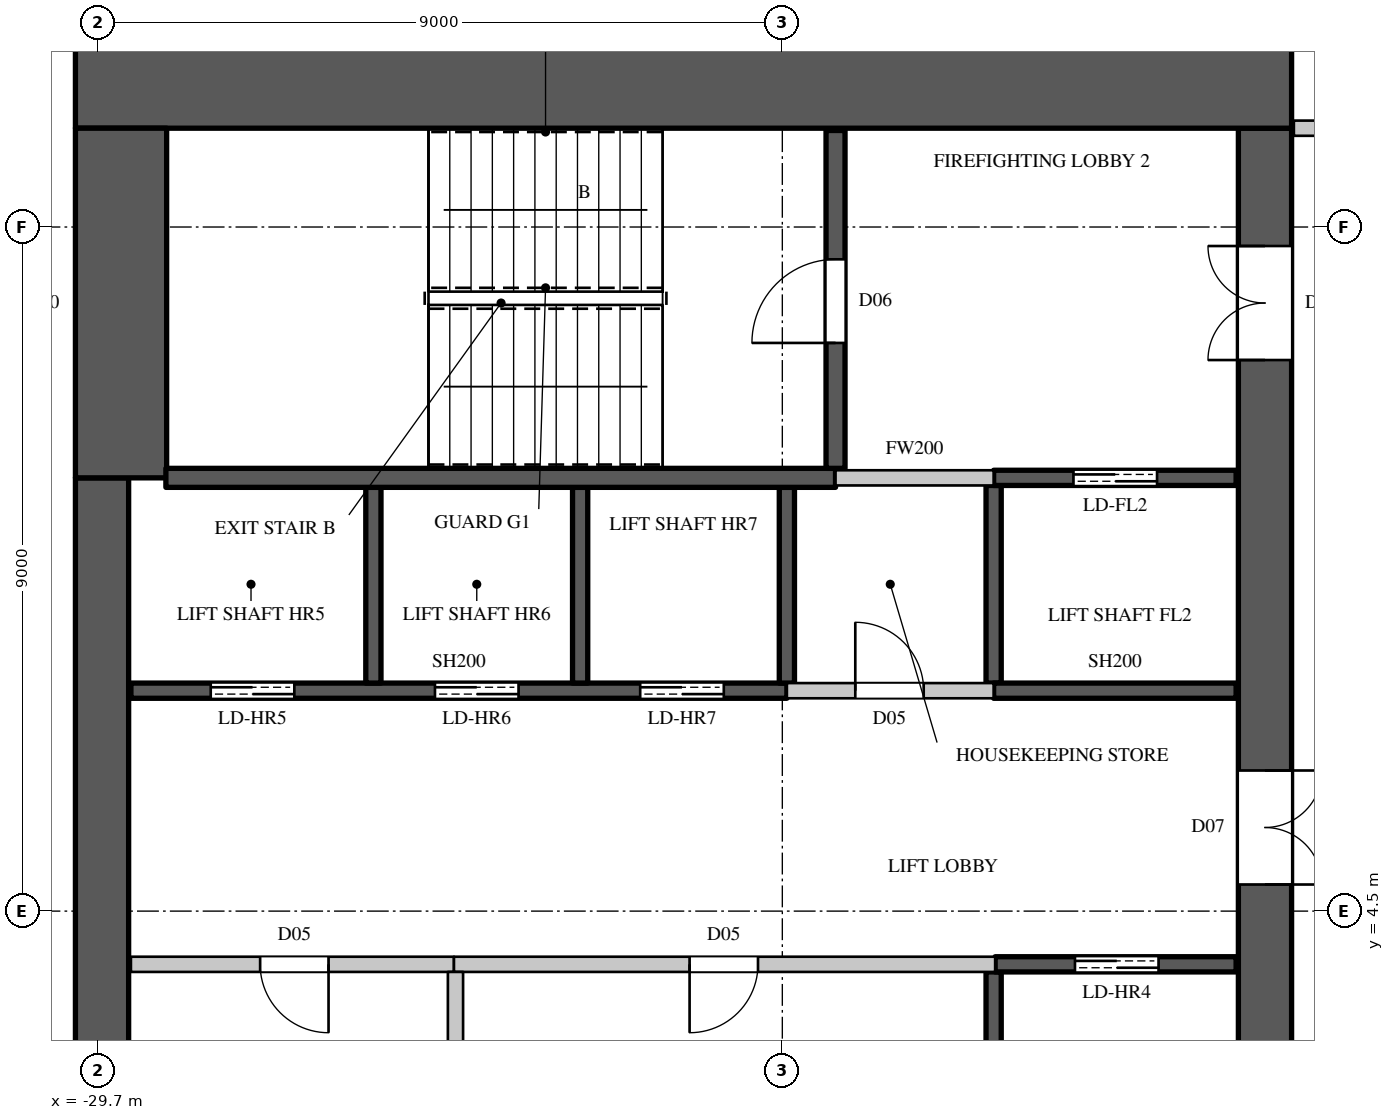
"""IFC4 building model, lengths in metres.
Left out: names, types, materials, properties, quantities, classifications, styles, units other than length and angle.
Written with IfcOpenShell. Run it as: python <this file> out.ifc"""

import sys

from ifc_helpers import new_model, si_unit, direction, frame, frame_2d, origin, place, context, subcontext, project, spatial, rectangle, extrude, element, fill, save


model = new_model("IFC4")
c1 = context("Model", 3, precision=1e-05, world=origin(), true_north=direction((0.0, 1.0)))
c2 = subcontext(c1, "Body", "Model", "MODEL_VIEW")
j1 = project(units=[si_unit("LENGTHUNIT", "METRE"), si_unit("PLANEANGLEUNIT", "RADIAN")], contexts=[c1])
p1 = place(None, origin())
s1 = spatial("IfcSite", under=j1, at=p1, CompositionType="ELEMENT")
p2 = place(p1, origin())
s2 = spatial("IfcBuilding", under=s1, at=p2, CompositionType="ELEMENT")
p3 = place(p2, frame((0.0, 0.0, 272.1)))
s3 = spatial("IfcBuildingStorey", under=s2, at=p3, CompositionType="ELEMENT", Elevation=272.1)
p4 = place(p3, frame((-30.0, 15.4, 0.0), z_axis=(0.0, 0.0, 1.0), x_axis=(1.0, 0.0, 0.0)))
e1 = element("IfcWall", 1, at=p4, inside=s3, PredefinedType="SHEAR", context=c2, shape_type="SweptSolid", body=[
    extrude(rectangle(XDim=16.0, YDim=1.2, at=frame_2d((8.0, 0.0))), origin(), (0.0, 0.0, 1.0), 4.1),
])
p5 = place(p3, frame((-14.35, -14.8, 0.0), z_axis=(0.0, 0.0, 1.0), x_axis=(0.0, 1.0, 0.0)))
e2 = element("IfcWall", 2, at=p5, inside=s3, PredefinedType="SHEAR", context=c2, shape_type="SweptSolid", body=[
    extrude(rectangle(XDim=29.6, YDim=0.7, at=frame_2d((14.8, 0.0))), origin(), (0.0, 0.0, 1.0), 4.1),
])
p6 = place(p5, frame((1.55, 0.0, 0.0)))
e3 = element("IfcOpeningElement", 3, at=p6, cuts=e2, PredefinedType="OPENING", context=c2, shape_type="SweptSolid", body=[
    extrude(rectangle(XDim=1.5, YDim=2.4, at=frame_2d((0.75, 1.2))), frame((0.0, 0.36, 0.0), z_axis=(0.0, -1.0, 0.0), x_axis=(1.0, 0.0, 0.0)), (0.0, 0.0, 1.0), 0.72),
])
p7 = place(p5, frame((26.55, 0.0, 0.0)))
e4 = element("IfcOpeningElement", 4, at=p7, cuts=e2, PredefinedType="OPENING", context=c2, shape_type="SweptSolid", body=[
    extrude(rectangle(XDim=1.5, YDim=2.4, at=frame_2d((0.75, 1.2))), frame((0.0, 0.36, 0.0), z_axis=(0.0, -1.0, 0.0), x_axis=(1.0, 0.0, 0.0)), (0.0, 0.0, 1.0), 0.72),
])
p8 = place(p5, frame((8.45, 0.0, 0.0)))
e5 = element("IfcOpeningElement", 5, at=p8, cuts=e2, PredefinedType="OPENING", context=c2, shape_type="SweptSolid", body=[
    extrude(rectangle(XDim=1.5, YDim=2.4, at=frame_2d((0.75, 1.2))), frame((0.0, 0.36, 0.0), z_axis=(0.0, -1.0, 0.0), x_axis=(1.0, 0.0, 0.0)), (0.0, 0.0, 1.0), 0.72),
])
p9 = place(p5, frame((19.65, 0.0, 0.0)))
e6 = element("IfcOpeningElement", 6, at=p9, cuts=e2, PredefinedType="OPENING", context=c2, shape_type="SweptSolid", body=[
    extrude(rectangle(XDim=1.5, YDim=2.4, at=frame_2d((0.75, 1.2))), frame((0.0, 0.36, 0.0), z_axis=(0.0, -1.0, 0.0), x_axis=(1.0, 0.0, 0.0)), (0.0, 0.0, 1.0), 0.72),
])
p10 = place(p5, frame((14.5, 0.0, 0.0)))
e7 = element("IfcOpeningElement", 7, at=p10, cuts=e2, PredefinedType="OPENING", context=c2, shape_type="SweptSolid", body=[
    extrude(rectangle(XDim=0.6, YDim=2.0, at=frame_2d((0.3, 1.0))), frame((0.0, 0.36, 0.0), z_axis=(0.0, -1.0, 0.0), x_axis=(1.0, 0.0, 0.0)), (0.0, 0.0, 1.0), 0.72),
])
p11 = place(p3, frame((-29.65, -10.2, 0.0), z_axis=(0.0, 0.0, 1.0), x_axis=(0.0, 1.0, 0.0)))
e8 = element("IfcWall", 8, at=p11, inside=s3, PredefinedType="SHEAR", context=c2, shape_type="SweptSolid", body=[
    extrude(rectangle(XDim=20.4, YDim=0.7, at=frame_2d((10.2, 0.0))), origin(), (0.0, 0.0, 1.0), 4.1),
])
p12 = place(p3, frame((-29.4, 10.2, 0.0), z_axis=(0.0, 0.0, 1.0), x_axis=(0.0, 1.0, 0.0)))
e9 = element("IfcWall", 9, at=p12, inside=s3, PredefinedType="SHEAR", context=c2, shape_type="SweptSolid", body=[
    extrude(rectangle(XDim=4.6, YDim=1.2, at=frame_2d((2.3, 0.0))), origin(), (0.0, 0.0, 1.0), 4.1),
])
p13 = place(p3, frame((-29.27, 3.8, 0.0), z_axis=(0.0, 0.0, 1.0), x_axis=(1.0, 0.0, 0.0)))
e10 = element("IfcWall", 10, at=p13, inside=s3, PredefinedType="PARTITIONING", context=c2, shape_type="SweptSolid", body=[
    extrude(rectangle(XDim=4.25, YDim=0.2, at=frame_2d((2.125, 0.0))), origin(), (0.0, 0.0, 1.0), 3.8),
])
p14 = place(p13, frame((1.7, 0.0, 0.0)))
e11 = element("IfcOpeningElement", 11, at=p14, cuts=e10, PredefinedType="OPENING", context=c2, shape_type="SweptSolid", body=[
    extrude(rectangle(XDim=0.9, YDim=2.2, at=frame_2d((0.45, 1.1))), frame((0.0, 0.11, 0.0), z_axis=(0.0, -1.0, 0.0), x_axis=(1.0, 0.0, 0.0)), (0.0, 0.0, 1.0), 0.22),
])
p15 = place(p3, frame((-20.64, 7.4, 0.0), z_axis=(0.0, 0.0, 1.0), x_axis=(1.0, 0.0, 0.0)))
e12 = element("IfcWall", 12, at=p15, inside=s3, PredefinedType="PARTITIONING", context=c2, shape_type="SweptSolid", body=[
    extrude(rectangle(XDim=2.72, YDim=0.2, at=frame_2d((1.36, 0.0))), origin(), (0.0, 0.0, 1.0), 3.8),
])
p16 = place(p15, frame((0.9, 0.0, 0.0)))
e13 = element("IfcOpeningElement", 13, at=p16, cuts=e12, PredefinedType="OPENING", context=c2, shape_type="SweptSolid", body=[
    extrude(rectangle(XDim=0.9, YDim=2.2, at=frame_2d((0.45, 1.1))), frame((0.0, 0.11, 0.0), z_axis=(0.0, -1.0, 0.0), x_axis=(1.0, 0.0, 0.0)), (0.0, 0.0, 1.0), 0.22),
])
p17 = place(p3, frame((-20.0, 10.2, 0.0), z_axis=(0.0, 0.0, 1.0), x_axis=(1.0, 0.0, 0.0)))
e14 = element("IfcWall", 14, at=p17, inside=s3, PredefinedType="PARTITIONING", context=c2, shape_type="SweptSolid", body=[
    extrude(rectangle(XDim=2.08, YDim=0.2, at=frame_2d((1.04, 0.0))), origin(), (0.0, 0.0, 1.0), 3.8),
])
p18 = place(p3, frame((-13.97, 14.8, 0.0), z_axis=(0.0, 0.0, 1.0), x_axis=(1.0, 0.0, 0.0)))
e15 = element("IfcWall", 15, at=p18, inside=s3, PredefinedType="PARTITIONING", context=c2, shape_type="SweptSolid", body=[
    extrude(rectangle(XDim=3.07, YDim=0.2, at=frame_2d((1.535, 0.0))), origin(), (0.0, 0.0, 1.0), 3.8),
])
p19 = place(p3, frame((-25.02, 3.8, 0.0), z_axis=(0.0, 0.0, 1.0), x_axis=(1.0, 0.0, 0.0)))
e16 = element("IfcWall", 16, at=p19, inside=s3, PredefinedType="PARTITIONING", context=c2, shape_type="SweptSolid", body=[
    extrude(rectangle(XDim=7.12, YDim=0.2, at=frame_2d((3.56, 0.0))), origin(), (0.0, 0.0, 1.0), 3.8),
])
p20 = place(p19, frame((3.1, 0.0, 0.0)))
e17 = element("IfcOpeningElement", 17, at=p20, cuts=e16, PredefinedType="OPENING", context=c2, shape_type="SweptSolid", body=[
    extrude(rectangle(XDim=0.9, YDim=2.2, at=frame_2d((0.45, 1.1))), frame((0.0, 0.11, 0.0), z_axis=(0.0, -1.0, 0.0), x_axis=(1.0, 0.0, 0.0)), (0.0, 0.0, 1.0), 0.22),
])
p21 = place(p3, frame((-25.0, 1.1, 0.0), z_axis=(0.0, 0.0, 1.0), x_axis=(0.0, 1.0, 0.0)))
e18 = element("IfcWall", 18, at=p21, inside=s3, PredefinedType="PARTITIONING", context=c2, shape_type="SweptSolid", body=[
    extrude(rectangle(XDim=2.6, YDim=0.2, at=frame_2d((1.3, 0.0))), origin(), (0.0, 0.0, 1.0), 3.8),
])
p22 = place(p3, frame((-29.27, 7.4, 0.0), z_axis=(0.0, 0.0, 1.0), x_axis=(1.0, 0.0, 0.0)))
e19 = element("IfcWall", 19, at=p22, inside=s3, PredefinedType="SHEAR", context=c2, shape_type="SweptSolid", body=[
    extrude(rectangle(XDim=8.63, YDim=0.2, at=frame_2d((4.315, 0.0))), origin(), (0.0, 0.0, 1.0), 3.8),
])
p23 = place(p22, frame((1.05, 0.0, 0.0)))
e20 = element("IfcOpeningElement", 20, at=p23, cuts=e19, PredefinedType="OPENING", context=c2, shape_type="SweptSolid", body=[
    extrude(rectangle(XDim=1.1, YDim=2.2, at=frame_2d((0.55, 1.1))), frame((0.0, 0.11, 0.0), z_axis=(0.0, -1.0, 0.0), x_axis=(1.0, 0.0, 0.0)), (0.0, 0.0, 1.0), 0.22),
])
p24 = place(p22, frame((4.0, 0.0, 0.0)))
e21 = element("IfcOpeningElement", 21, at=p24, cuts=e19, PredefinedType="OPENING", context=c2, shape_type="SweptSolid", body=[
    extrude(rectangle(XDim=1.1, YDim=2.2, at=frame_2d((0.55, 1.1))), frame((0.0, 0.11, 0.0), z_axis=(0.0, -1.0, 0.0), x_axis=(1.0, 0.0, 0.0)), (0.0, 0.0, 1.0), 0.22),
])
p25 = place(p22, frame((6.7, 0.0, 0.0)))
e22 = element("IfcOpeningElement", 22, at=p25, cuts=e19, PredefinedType="OPENING", context=c2, shape_type="SweptSolid", body=[
    extrude(rectangle(XDim=1.1, YDim=2.2, at=frame_2d((0.55, 1.1))), frame((0.0, 0.11, 0.0), z_axis=(0.0, -1.0, 0.0), x_axis=(1.0, 0.0, 0.0)), (0.0, 0.0, 1.0), 0.22),
])
for number, where, z_axis, x_axis in (
    (23, (-26.08, 7.5, 0.0), (0.0, 0.0, 1.0), (0.0, 1.0, 0.0)),
    (24, (-23.36, 7.5, 0.0), (0.0, 0.0, 1.0), (0.0, 1.0, 0.0)),
):
    element("IfcWall", number, at=place(p3, frame(where, z_axis=z_axis, x_axis=x_axis)), inside=s3, PredefinedType="SHEAR", context=c2, shape_type="SweptSolid", body=[
        extrude(rectangle(XDim=2.575, YDim=0.2, at=frame_2d((1.288, 0.0))), origin(), (0.0, 0.0, 1.0), 4.1),
    ])
p26 = place(p3, frame((-20.64, 7.5, 0.0), z_axis=(0.0, 0.0, 1.0), x_axis=(0.0, 1.0, 0.0)))
e25 = element("IfcWall", 25, at=p26, inside=s3, PredefinedType="SHEAR", context=c2, shape_type="SweptSolid", body=[
    extrude(rectangle(XDim=2.575, YDim=0.2, at=frame_2d((1.288, 0.0))), origin(), (0.0, 0.0, 1.0), 3.8),
])
p27 = place(p3, frame((-17.92, 1.1, 0.0), z_axis=(0.0, 0.0, 1.0), x_axis=(0.0, 1.0, 0.0)))
e26 = element("IfcWall", 26, at=p27, inside=s3, PredefinedType="SHEAR", context=c2, shape_type="SweptSolid", body=[
    extrude(rectangle(XDim=2.6, YDim=0.2, at=frame_2d((1.3, 0.0))), origin(), (0.0, 0.0, 1.0), 3.8),
])
p28 = place(p3, frame((-17.9, 3.8, 0.0), z_axis=(0.0, 0.0, 1.0), x_axis=(1.0, 0.0, 0.0)))
e27 = element("IfcWall", 27, at=p28, inside=s3, PredefinedType="SHEAR", context=c2, shape_type="SweptSolid", body=[
    extrude(rectangle(XDim=3.17, YDim=0.2, at=frame_2d((1.585, 0.0))), origin(), (0.0, 0.0, 1.0), 3.8),
])
p29 = place(p28, frame((1.05, 0.0, 0.0)))
e28 = element("IfcOpeningElement", 28, at=p29, cuts=e27, PredefinedType="OPENING", context=c2, shape_type="SweptSolid", body=[
    extrude(rectangle(XDim=1.1, YDim=2.2, at=frame_2d((0.55, 1.1))), frame((0.0, 0.11, 0.0), z_axis=(0.0, -1.0, 0.0), x_axis=(1.0, 0.0, 0.0)), (0.0, 0.0, 1.0), 0.22),
])
p30 = place(p3, frame((-17.92, 7.5, 0.0), z_axis=(0.0, 0.0, 1.0), x_axis=(0.0, 1.0, 0.0)))
e29 = element("IfcWall", 29, at=p30, inside=s3, PredefinedType="SHEAR", context=c2, shape_type="SweptSolid", body=[
    extrude(rectangle(XDim=2.6, YDim=0.2, at=frame_2d((1.3, 0.0))), origin(), (0.0, 0.0, 1.0), 3.8),
])
p31 = place(p3, frame((-17.92, 7.4, 0.0), z_axis=(0.0, 0.0, 1.0), x_axis=(1.0, 0.0, 0.0)))
e30 = element("IfcWall", 30, at=p31, inside=s3, PredefinedType="SHEAR", context=c2, shape_type="SweptSolid", body=[
    extrude(rectangle(XDim=3.19, YDim=0.2, at=frame_2d((1.595, 0.0))), origin(), (0.0, 0.0, 1.0), 3.8),
])
p32 = place(p3, frame((-17.92, 10.2, 0.0), z_axis=(0.0, 0.0, 1.0), x_axis=(1.0, 0.0, 0.0)))
e31 = element("IfcWall", 31, at=p32, inside=s3, PredefinedType="SHEAR", context=c2, shape_type="SweptSolid", body=[
    extrude(rectangle(XDim=3.19, YDim=0.2, at=frame_2d((1.595, 0.0))), origin(), (0.0, 0.0, 1.0), 3.8),
])
p33 = place(p32, frame((1.05, 0.0, 0.0)))
e32 = element("IfcOpeningElement", 32, at=p33, cuts=e31, PredefinedType="OPENING", context=c2, shape_type="SweptSolid", body=[
    extrude(rectangle(XDim=1.1, YDim=2.2, at=frame_2d((0.55, 1.1))), frame((0.0, 0.11, 0.0), z_axis=(0.0, -1.0, 0.0), x_axis=(1.0, 0.0, 0.0)), (0.0, 0.0, 1.0), 0.22),
])
p34 = place(p3, frame((-28.81, 10.2, 0.0), z_axis=(0.0, 0.0, 1.0), x_axis=(1.0, 0.0, 0.0)))
e33 = element("IfcWall", 33, at=p34, inside=s3, PredefinedType="SHEAR", context=c2, shape_type="SweptSolid", body=[
    extrude(rectangle(XDim=8.81, YDim=0.25, at=frame_2d((4.405, 0.0))), origin(), (0.0, 0.0, 1.0), 3.8),
])
p35 = place(p3, frame((-20.0, 10.325, 0.0), z_axis=(0.0, 0.0, 1.0), x_axis=(0.0, 1.0, 0.0)))
e34 = element("IfcWall", 34, at=p35, inside=s3, PredefinedType="SHEAR", context=c2, shape_type="SweptSolid", body=[
    extrude(rectangle(XDim=4.445, YDim=0.25, at=frame_2d((2.223, 0.0))), origin(), (0.0, 0.0, 1.0), 3.8),
])
p36 = place(p35, frame((1.65, 0.0, 0.0)))
e35 = element("IfcOpeningElement", 35, at=p36, cuts=e34, PredefinedType="OPENING", context=c2, shape_type="SweptSolid", body=[
    extrude(rectangle(XDim=1.1, YDim=2.2, at=frame_2d((0.55, 1.1))), frame((0.0, 0.135, 0.0), z_axis=(0.0, -1.0, 0.0), x_axis=(1.0, 0.0, 0.0)), (0.0, 0.0, 1.0), 0.27),
])
p37 = place(p36, origin())
e36 = element("IfcDoor", 36, at=p37, inside=s3, OperationType="SINGLE_SWING_LEFT", PredefinedType="DOOR", context=c2, shape_type="SweptSolid", body=[
    extrude(rectangle(XDim=1.1, YDim=2.2, at=frame_2d((0.55, 1.1))), frame((0.0, 0.025, 0.0), z_axis=(0.0, -1.0, 0.0), x_axis=(1.0, 0.0, 0.0)), (0.0, 0.0, 1.0), 0.05),
])
fill(e35, e36)
p38 = place(p14, origin())
e37 = element("IfcDoor", 37, at=p38, inside=s3, OperationType="SINGLE_SWING_LEFT", PredefinedType="DOOR", context=c2, shape_type="SweptSolid", body=[
    extrude(rectangle(XDim=0.9, YDim=2.2, at=frame_2d((0.45, 1.1))), frame((0.0, 0.025, 0.0), z_axis=(0.0, -1.0, 0.0), x_axis=(1.0, 0.0, 0.0)), (0.0, 0.0, 1.0), 0.05),
])
fill(e11, e37)
p39 = place(p20, origin())
e38 = element("IfcDoor", 38, at=p39, inside=s3, OperationType="SINGLE_SWING_RIGHT", PredefinedType="DOOR", context=c2, shape_type="SweptSolid", body=[
    extrude(rectangle(XDim=0.9, YDim=2.2, at=frame_2d((0.45, 1.1))), frame((0.0, 0.025, 0.0), z_axis=(0.0, -1.0, 0.0), x_axis=(1.0, 0.0, 0.0)), (0.0, 0.0, 1.0), 0.05),
])
fill(e17, e38)
p40 = place(p16, origin())
e39 = element("IfcDoor", 39, at=p40, inside=s3, OperationType="SINGLE_SWING_LEFT", PredefinedType="DOOR", context=c2, shape_type="SweptSolid", body=[
    extrude(rectangle(XDim=0.9, YDim=2.2, at=frame_2d((0.45, 1.1))), frame((0.0, 0.025, 0.0), z_axis=(0.0, -1.0, 0.0), x_axis=(1.0, 0.0, 0.0)), (0.0, 0.0, 1.0), 0.05),
])
fill(e13, e39)
p41 = place(p29, origin())
e40 = element("IfcDoor", 40, at=p41, inside=s3, OperationType="DOUBLE_DOOR_SLIDING", PredefinedType="DOOR", context=c2, shape_type="SweptSolid", body=[
    extrude(rectangle(XDim=1.1, YDim=2.2, at=frame_2d((0.55, 1.1))), frame((0.0, 0.025, 0.0), z_axis=(0.0, -1.0, 0.0), x_axis=(1.0, 0.0, 0.0)), (0.0, 0.0, 1.0), 0.05),
])
fill(e28, e40)
p42 = place(p23, origin())
e41 = element("IfcDoor", 41, at=p42, inside=s3, OperationType="DOUBLE_DOOR_SLIDING", PredefinedType="DOOR", context=c2, shape_type="SweptSolid", body=[
    extrude(rectangle(XDim=1.1, YDim=2.2, at=frame_2d((0.55, 1.1))), frame((0.0, 0.025, 0.0), z_axis=(0.0, -1.0, 0.0), x_axis=(1.0, 0.0, 0.0)), (0.0, 0.0, 1.0), 0.05),
])
fill(e20, e41)
p43 = place(p24, origin())
e42 = element("IfcDoor", 42, at=p43, inside=s3, OperationType="DOUBLE_DOOR_SLIDING", PredefinedType="DOOR", context=c2, shape_type="SweptSolid", body=[
    extrude(rectangle(XDim=1.1, YDim=2.2, at=frame_2d((0.55, 1.1))), frame((0.0, 0.025, 0.0), z_axis=(0.0, -1.0, 0.0), x_axis=(1.0, 0.0, 0.0)), (0.0, 0.0, 1.0), 0.05),
])
fill(e21, e42)
p44 = place(p25, origin())
e43 = element("IfcDoor", 43, at=p44, inside=s3, OperationType="DOUBLE_DOOR_SLIDING", PredefinedType="DOOR", context=c2, shape_type="SweptSolid", body=[
    extrude(rectangle(XDim=1.1, YDim=2.2, at=frame_2d((0.55, 1.1))), frame((0.0, 0.025, 0.0), z_axis=(0.0, -1.0, 0.0), x_axis=(1.0, 0.0, 0.0)), (0.0, 0.0, 1.0), 0.05),
])
fill(e22, e43)
p45 = place(p33, origin())
e44 = element("IfcDoor", 44, at=p45, inside=s3, OperationType="DOUBLE_DOOR_SLIDING", PredefinedType="DOOR", context=c2, shape_type="SweptSolid", body=[
    extrude(rectangle(XDim=1.1, YDim=2.2, at=frame_2d((0.55, 1.1))), frame((0.0, 0.025, 0.0), z_axis=(0.0, -1.0, 0.0), x_axis=(1.0, 0.0, 0.0)), (0.0, 0.0, 1.0), 0.05),
])
fill(e32, e44)
p46 = place(p7, origin())
e45 = element("IfcDoor", 45, at=p46, inside=s3, OperationType="DOUBLE_DOOR_SINGLE_SWING", PredefinedType="DOOR", context=c2, shape_type="SweptSolid", body=[
    extrude(rectangle(XDim=1.5, YDim=2.4, at=frame_2d((0.75, 1.2))), frame((0.0, 0.345, 0.0), z_axis=(0.0, -1.0, 0.0), x_axis=(1.0, 0.0, 0.0)), (0.0, 0.0, 1.0), 0.05),
])
fill(e4, e45)
p47 = place(p9, origin())
e46 = element("IfcDoor", 46, at=p47, inside=s3, OperationType="DOUBLE_DOOR_SINGLE_SWING", PredefinedType="DOOR", context=c2, shape_type="SweptSolid", body=[
    extrude(rectangle(XDim=1.5, YDim=2.4, at=frame_2d((0.75, 1.2))), frame((0.0, -0.295, 0.0), z_axis=(0.0, -1.0, 0.0), x_axis=(1.0, 0.0, 0.0)), (0.0, 0.0, 1.0), 0.05),
])
fill(e6, e46)
save(model, sys.argv[1])
